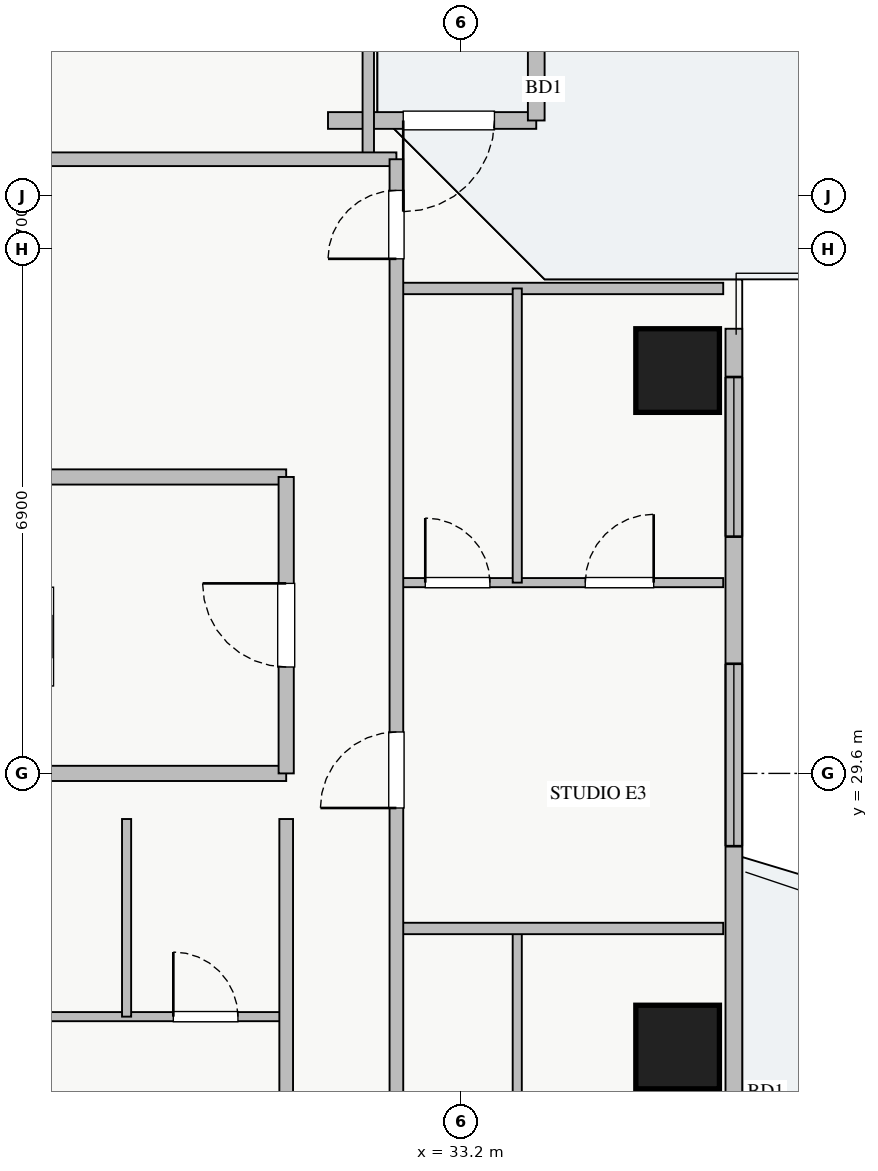
"""IFC4 building model, lengths in metres.
Left out: names, types, materials, properties, quantities, classifications, styles, units other than length and angle.
Written with IfcOpenShell. Run it as: python <this file> out.ifc"""

import sys

from ifc_helpers import new_model, si_unit, direction, frame, frame_2d, origin, origin_2d, place, context, subcontext, project, spatial, rectangle, extrude, source, transform, mapped, element, fill, save


model = new_model("IFC4")
c1 = context("Model", 3, precision=1e-05, world=origin(), true_north=direction((0.0, 1.0)))
c2 = subcontext(c1, "Body", "Model", "MODEL_VIEW")
j1 = project(units=[si_unit("LENGTHUNIT", "METRE"), si_unit("PLANEANGLEUNIT", "RADIAN")], contexts=[c1])
p1 = place(None, origin())
s1 = spatial("IfcSite", under=j1, at=p1, CompositionType="ELEMENT")
p2 = place(p1, origin())
s2 = spatial("IfcBuilding", under=s1, at=p2, CompositionType="ELEMENT")
p3 = place(p2, frame((0.0, 0.0, 123.0)))
s3 = spatial("IfcBuildingStorey", under=s2, at=p3, CompositionType="ELEMENT", Elevation=123.0)
m1 = source(origin(), c2, "Body", "SweptSolid", [
    extrude(rectangle(XDim=1.1, YDim=1.1, at=origin_2d()), origin(), (0.0, 0.0, 1.0), 3.25),
])
for number, where, z_axis, x_axis in (
    (1, (36.05, 26.0, 0.0), (0.0, 0.0, 1.0), (1.0, 0.0, 0.0)),
    (2, (36.05, 34.9, 0.0), (0.0, 0.0, 1.0), (1.0, 0.0, 0.0)),
):
    element("IfcColumn", number, at=place(p3, frame(where, z_axis=z_axis, x_axis=x_axis)), inside=s3, PredefinedType="COLUMN", context=c2, shape_type="MappedRepresentation", body=[
        mapped(m1, transform((0.0, 0.0, 0.0), x_axis=(1.0, 0.0, 0.0), y_axis=(0.0, 1.0, 0.0), z_axis=(0.0, 0.0, 1.0), scale=1.0)),
    ])
p4 = place(p3, frame((36.79, 10.55, 0.0), z_axis=(0.0, 0.0, 1.0), x_axis=(0.0, 1.0, 0.0)))
e3 = element("IfcWall", 3, at=p4, inside=s3, PredefinedType="STANDARD", context=c2, shape_type="SweptSolid", body=[
    extrude(rectangle(XDim=24.9, YDim=0.22, at=frame_2d((12.45, 0.0))), origin(), (0.0, 0.0, 1.0), 2.61),
])
p5 = place(p4, frame((13.3, 0.0, 0.0)))
e4 = element("IfcOpeningElement", 4, at=p5, cuts=e3, PredefinedType="OPENING", context=c2, shape_type="SweptSolid", body=[
    extrude(rectangle(XDim=1.2, YDim=2.1, at=frame_2d((0.6, 1.05))), frame((0.0, 0.12, 0.0), z_axis=(0.0, -1.0, 0.0), x_axis=(1.0, 0.0, 0.0)), (0.0, 0.0, 1.0), 0.24),
])
p6 = place(p4, frame((1.912, 0.0, 0.9)))
e5 = element("IfcOpeningElement", 5, at=p6, cuts=e3, PredefinedType="OPENING", context=c2, shape_type="SweptSolid", body=[
    extrude(rectangle(XDim=2.4, YDim=1.48, at=frame_2d((1.2, 0.74))), frame((0.0, 0.12, 0.0), z_axis=(0.0, -1.0, 0.0), x_axis=(1.0, 0.0, 0.0)), (0.0, 0.0, 1.0), 0.24),
])
p7 = place(p4, frame((22.165, 0.0, 0.9)))
e6 = element("IfcOpeningElement", 6, at=p7, cuts=e3, PredefinedType="OPENING", context=c2, shape_type="SweptSolid", body=[
    extrude(rectangle(XDim=2.1, YDim=1.5, at=frame_2d((1.05, 0.75))), frame((0.0, 0.12, 0.0), z_axis=(0.0, -1.0, 0.0), x_axis=(1.0, 0.0, 0.0)), (0.0, 0.0, 1.0), 0.24),
])
p8 = place(p4, frame((18.093, 0.0, 0.9)))
e7 = element("IfcOpeningElement", 7, at=p8, cuts=e3, PredefinedType="OPENING", context=c2, shape_type="SweptSolid", body=[
    extrude(rectangle(XDim=2.4, YDim=1.5, at=frame_2d((1.2, 0.75))), frame((0.0, 0.12, 0.0), z_axis=(0.0, -1.0, 0.0), x_axis=(1.0, 0.0, 0.0)), (0.0, 0.0, 1.0), 0.24),
])
p9 = place(p4, frame((7.875, 0.0, 0.9)))
e8 = element("IfcOpeningElement", 8, at=p9, cuts=e3, PredefinedType="OPENING", context=c2, shape_type="SweptSolid", body=[
    extrude(rectangle(XDim=0.9, YDim=1.2, at=frame_2d((0.45, 0.6))), frame((0.0, 0.12, 0.0), z_axis=(0.0, -1.0, 0.0), x_axis=(1.0, 0.0, 0.0)), (0.0, 0.0, 1.0), 0.24),
])
p10 = place(p3, frame((31.45, 38.19, 0.0), z_axis=(0.0, 0.0, 1.0), x_axis=(1.0, 0.0, 0.0)))
e9 = element("IfcWall", 9, at=p10, inside=s3, PredefinedType="STANDARD", context=c2, shape_type="SweptSolid", body=[
    extrude(rectangle(XDim=2.74, YDim=0.22, at=frame_2d((1.37, 0.0))), origin(), (0.0, 0.0, 1.0), 2.61),
])
p11 = place(p10, frame((0.99, 0.0, 0.0)))
e10 = element("IfcOpeningElement", 10, at=p11, cuts=e9, PredefinedType="OPENING", context=c2, shape_type="SweptSolid", body=[
    extrude(rectangle(XDim=1.2, YDim=2.1, at=frame_2d((0.6, 1.05))), frame((0.0, 0.12, 0.0), z_axis=(0.0, -1.0, 0.0), x_axis=(1.0, 0.0, 0.0)), (0.0, 0.0, 1.0), 0.24),
])
p12 = place(p3, frame((34.19, 38.19, 0.0), z_axis=(0.0, 0.0, 1.0), x_axis=(0.0, 1.0, 0.0)))
e11 = element("IfcWall", 11, at=p12, inside=s3, PredefinedType="STANDARD", context=c2, shape_type="SweptSolid", body=[
    extrude(rectangle(XDim=2.86, YDim=0.22, at=frame_2d((1.43, 0.0))), origin(), (0.0, 0.0, 1.0), 2.61),
])
for number, where, z_axis, x_axis in (
    (12, (27.8, 29.6, 0.0), (0.0, 0.0, 1.0), (1.0, 0.0, 0.0)),
    (13, (27.8, 33.5, 0.0), (0.0, 0.0, 1.0), (1.0, 0.0, 0.0)),
):
    element("IfcWall", number, at=place(p3, frame(where, z_axis=z_axis, x_axis=x_axis)), inside=s3, PredefinedType="PARTITIONING", context=c2, shape_type="SweptSolid", body=[
        extrude(rectangle(XDim=3.1, YDim=0.2, at=frame_2d((1.55, 0.0))), origin(), (0.0, 0.0, 1.0), 3.07),
    ])
p13 = place(p3, frame((30.9, 29.6, 0.0), z_axis=(0.0, 0.0, 1.0), x_axis=(0.0, 1.0, 0.0)))
e14 = element("IfcWall", 14, at=p13, inside=s3, PredefinedType="PARTITIONING", context=c2, shape_type="SweptSolid", body=[
    extrude(rectangle(XDim=3.9, YDim=0.2, at=frame_2d((1.95, 0.0))), origin(), (0.0, 0.0, 1.0), 3.07),
])
p14 = place(p13, frame((1.4, 0.0, 0.0)))
e15 = element("IfcOpeningElement", 15, at=p14, cuts=e14, PredefinedType="OPENING", context=c2, shape_type="SweptSolid", body=[
    extrude(rectangle(XDim=1.1, YDim=2.05, at=frame_2d((0.55, 1.025))), frame((0.0, 0.11, 0.0), z_axis=(0.0, -1.0, 0.0), x_axis=(1.0, 0.0, 0.0)), (0.0, 0.0, 1.0), 0.22),
])
p15 = place(p3, frame((31.98, 37.68, 0.0), z_axis=(0.0, 0.0, 1.0), x_axis=(0.0, 1.0, 0.0)))
e16 = element("IfcWall", 16, at=p15, inside=s3, PredefinedType="PARTITIONING", context=c2, shape_type="SweptSolid", body=[
    extrude(rectangle(XDim=2.97, YDim=0.15, at=frame_2d((1.485, 0.0))), origin(), (0.0, 0.0, 1.0), 3.07),
])
p16 = place(p3, frame((8.72, 37.68, 0.0), z_axis=(0.0, 0.0, 1.0), x_axis=(1.0, 0.0, 0.0)))
e17 = element("IfcWall", 17, at=p16, inside=s3, PredefinedType="PARTITIONING", context=c2, shape_type="SweptSolid", body=[
    extrude(rectangle(XDim=23.63, YDim=0.18, at=frame_2d((11.815, 0.0))), origin(), (0.0, 0.0, 1.0), 3.07),
])
p17 = place(p16, frame((6.04, 0.0, 0.0)))
e18 = element("IfcOpeningElement", 18, at=p17, cuts=e17, PredefinedType="OPENING", context=c2, shape_type="SweptSolid", body=[
    extrude(rectangle(XDim=1.0, YDim=2.05, at=frame_2d((0.5, 1.025))), frame((0.0, 0.1, 0.0), z_axis=(0.0, -1.0, 0.0), x_axis=(1.0, 0.0, 0.0)), (0.0, 0.0, 1.0), 0.2),
])
p18 = place(p16, frame((17.67, 0.0, 0.0)))
e19 = element("IfcOpeningElement", 19, at=p18, cuts=e17, PredefinedType="OPENING", context=c2, shape_type="SweptSolid", body=[
    extrude(rectangle(XDim=1.0, YDim=2.05, at=frame_2d((0.5, 1.025))), frame((0.0, 0.1, 0.0), z_axis=(0.0, -1.0, 0.0), x_axis=(1.0, 0.0, 0.0)), (0.0, 0.0, 1.0), 0.2),
])
p19 = place(p3, frame((32.35, 35.98, 0.0), z_axis=(0.0, 0.0, 1.0), x_axis=(1.0, 0.0, 0.0)))
e20 = element("IfcWall", 20, at=p19, inside=s3, PredefinedType="PARTITIONING", context=c2, shape_type="SweptSolid", body=[
    extrude(rectangle(XDim=4.3, YDim=0.15, at=frame_2d((2.15, 0.0))), origin(), (0.0, 0.0, 1.0), 3.07),
])
p20 = place(p3, frame((33.94, 23.1, 0.0), z_axis=(0.0, 0.0, 1.0), x_axis=(0.0, 1.0, 0.0)))
e21 = element("IfcWall", 21, at=p20, inside=s3, PredefinedType="PLUMBINGWALL", context=c2, shape_type="SweptSolid", body=[
    extrude(rectangle(XDim=4.46, YDim=0.12, at=frame_2d((2.23, 0.0))), origin(), (0.0, 0.0, 1.0), 3.07),
])
p21 = place(p3, frame((32.35, 32.11, 0.0), z_axis=(0.0, 0.0, 1.0), x_axis=(1.0, 0.0, 0.0)))
e22 = element("IfcWall", 22, at=p21, inside=s3, PredefinedType="PLUMBINGWALL", context=c2, shape_type="SweptSolid", body=[
    extrude(rectangle(XDim=4.3, YDim=0.12, at=frame_2d((2.15, 0.0))), origin(), (0.0, 0.0, 1.0), 3.07),
])
p22 = place(p21, frame((0.38, 0.0, 0.0)))
e23 = element("IfcOpeningElement", 23, at=p22, cuts=e22, PredefinedType="OPENING", context=c2, shape_type="SweptSolid", body=[
    extrude(rectangle(XDim=0.85, YDim=2.05, at=frame_2d((0.425, 1.025))), frame((0.0, 0.07, 0.0), z_axis=(0.0, -1.0, 0.0), x_axis=(1.0, 0.0, 0.0)), (0.0, 0.0, 1.0), 0.14),
])
p23 = place(p21, frame((2.485, 0.0, 0.0)))
e24 = element("IfcOpeningElement", 24, at=p23, cuts=e22, PredefinedType="OPENING", context=c2, shape_type="SweptSolid", body=[
    extrude(rectangle(XDim=0.9, YDim=2.05, at=frame_2d((0.45, 1.025))), frame((0.0, 0.07, 0.0), z_axis=(0.0, -1.0, 0.0), x_axis=(1.0, 0.0, 0.0)), (0.0, 0.0, 1.0), 0.14),
])
p24 = place(p3, frame((33.94, 32.11, 0.0), z_axis=(0.0, 0.0, 1.0), x_axis=(0.0, 1.0, 0.0)))
e25 = element("IfcWall", 25, at=p24, inside=s3, PredefinedType="PLUMBINGWALL", context=c2, shape_type="SweptSolid", body=[
    extrude(rectangle(XDim=3.87, YDim=0.12, at=frame_2d((1.935, 0.0))), origin(), (0.0, 0.0, 1.0), 3.07),
])
p25 = place(p3, frame((32.35, 27.56, 0.0), z_axis=(0.0, 0.0, 1.0), x_axis=(1.0, 0.0, 0.0)))
e26 = element("IfcWall", 26, at=p25, inside=s3, PredefinedType="PARTITIONING", context=c2, shape_type="SweptSolid", body=[
    extrude(rectangle(XDim=4.3, YDim=0.15, at=frame_2d((2.15, 0.0))), origin(), (0.0, 0.0, 1.0), 3.07),
])
p26 = place(p3, frame((32.35, 8.31, 0.0), z_axis=(0.0, 0.0, 1.0), x_axis=(0.0, 1.0, 0.0)))
e27 = element("IfcWall", 27, at=p26, inside=s3, PredefinedType="PARTITIONING", context=c2, shape_type="SweptSolid", body=[
    extrude(rectangle(XDim=29.37, YDim=0.18, at=frame_2d((14.685, 0.0))), origin(), (0.0, 0.0, 1.0), 3.07),
])
p27 = place(p26, frame((28.06, 0.0, 0.0)))
e28 = element("IfcOpeningElement", 28, at=p27, cuts=e27, PredefinedType="OPENING", context=c2, shape_type="SweptSolid", body=[
    extrude(rectangle(XDim=0.9, YDim=2.05, at=frame_2d((0.45, 1.025))), frame((0.0, 0.1, 0.0), z_axis=(0.0, -1.0, 0.0), x_axis=(1.0, 0.0, 0.0)), (0.0, 0.0, 1.0), 0.2),
])
p28 = place(p26, frame((0.415, 0.0, 0.0)))
e29 = element("IfcOpeningElement", 29, at=p28, cuts=e27, PredefinedType="OPENING", context=c2, shape_type="SweptSolid", body=[
    extrude(rectangle(XDim=0.9, YDim=2.05, at=frame_2d((0.45, 1.025))), frame((0.0, 0.1, 0.0), z_axis=(0.0, -1.0, 0.0), x_axis=(1.0, 0.0, 0.0)), (0.0, 0.0, 1.0), 0.2),
])
p29 = place(p26, frame((5.295, 0.0, 0.0)))
e30 = element("IfcOpeningElement", 30, at=p29, cuts=e27, PredefinedType="OPENING", context=c2, shape_type="SweptSolid", body=[
    extrude(rectangle(XDim=1.0, YDim=2.05, at=frame_2d((0.5, 1.025))), frame((0.0, 0.1, 0.0), z_axis=(0.0, -1.0, 0.0), x_axis=(1.0, 0.0, 0.0)), (0.0, 0.0, 1.0), 0.2),
])
p30 = place(p26, frame((11.645, 0.0, 0.0)))
e31 = element("IfcOpeningElement", 31, at=p30, cuts=e27, PredefinedType="OPENING", context=c2, shape_type="SweptSolid", body=[
    extrude(rectangle(XDim=1.0, YDim=2.05, at=frame_2d((0.5, 1.025))), frame((0.0, 0.1, 0.0), z_axis=(0.0, -1.0, 0.0), x_axis=(1.0, 0.0, 0.0)), (0.0, 0.0, 1.0), 0.2),
])
p31 = place(p26, frame((20.835, 0.0, 0.0)))
e32 = element("IfcOpeningElement", 32, at=p31, cuts=e27, PredefinedType="OPENING", context=c2, shape_type="SweptSolid", body=[
    extrude(rectangle(XDim=1.0, YDim=2.05, at=frame_2d((0.5, 1.025))), frame((0.0, 0.1, 0.0), z_axis=(0.0, -1.0, 0.0), x_axis=(1.0, 0.0, 0.0)), (0.0, 0.0, 1.0), 0.2),
])
p32 = place(p3, frame((25.22, 26.4, 0.0), z_axis=(0.0, 0.0, 1.0), x_axis=(1.0, 0.0, 0.0)))
e33 = element("IfcWall", 33, at=p32, inside=s3, PredefinedType="PLUMBINGWALL", context=c2, shape_type="SweptSolid", body=[
    extrude(rectangle(XDim=5.68, YDim=0.12, at=frame_2d((2.84, 0.0))), origin(), (0.0, 0.0, 1.0), 3.07),
])
p33 = place(p32, frame((1.35, 0.0, 0.0)))
e34 = element("IfcOpeningElement", 34, at=p33, cuts=e33, PredefinedType="OPENING", context=c2, shape_type="SweptSolid", body=[
    extrude(rectangle(XDim=0.9, YDim=2.05, at=frame_2d((0.45, 1.025))), frame((0.0, 0.07, 0.0), z_axis=(0.0, -1.0, 0.0), x_axis=(1.0, 0.0, 0.0)), (0.0, 0.0, 1.0), 0.14),
])
p34 = place(p32, frame((4.195, 0.0, 0.0)))
e35 = element("IfcOpeningElement", 35, at=p34, cuts=e33, PredefinedType="OPENING", context=c2, shape_type="SweptSolid", body=[
    extrude(rectangle(XDim=0.85, YDim=2.05, at=frame_2d((0.425, 1.025))), frame((0.0, 0.07, 0.0), z_axis=(0.0, -1.0, 0.0), x_axis=(1.0, 0.0, 0.0)), (0.0, 0.0, 1.0), 0.14),
])
p35 = place(p3, frame((28.8, 26.4, 0.0), z_axis=(0.0, 0.0, 1.0), x_axis=(0.0, 1.0, 0.0)))
e36 = element("IfcWall", 36, at=p35, inside=s3, PredefinedType="PLUMBINGWALL", context=c2, shape_type="SweptSolid", body=[
    extrude(rectangle(XDim=2.6, YDim=0.12, at=frame_2d((1.3, 0.0))), origin(), (0.0, 0.0, 1.0), 3.07),
])
p36 = place(p3, frame((30.9, 17.0, 0.0), z_axis=(0.0, 0.0, 1.0), x_axis=(0.0, 1.0, 0.0)))
e37 = element("IfcWall", 37, at=p36, inside=s3, PredefinedType="PARTITIONING", context=c2, shape_type="SweptSolid", body=[
    extrude(rectangle(XDim=12.0, YDim=0.18, at=frame_2d((6.0, 0.0))), origin(), (0.0, 0.0, 1.0), 3.07),
])
p37 = place(p36, frame((1.025, 0.0, 0.0)))
e38 = element("IfcOpeningElement", 38, at=p37, cuts=e37, PredefinedType="OPENING", context=c2, shape_type="SweptSolid", body=[
    extrude(rectangle(XDim=1.0, YDim=2.05, at=frame_2d((0.5, 1.025))), frame((0.0, 0.1, 0.0), z_axis=(0.0, -1.0, 0.0), x_axis=(1.0, 0.0, 0.0)), (0.0, 0.0, 1.0), 0.2),
])
p38 = place(p36, frame((7.185, 0.0, 0.0)))
e39 = element("IfcOpeningElement", 39, at=p38, cuts=e37, PredefinedType="OPENING", context=c2, shape_type="SweptSolid", body=[
    extrude(rectangle(XDim=1.0, YDim=2.05, at=frame_2d((0.5, 1.025))), frame((0.0, 0.1, 0.0), z_axis=(0.0, -1.0, 0.0), x_axis=(1.0, 0.0, 0.0)), (0.0, 0.0, 1.0), 0.2),
])
m2 = source(origin(), c2, "Body", "SweptSolid", [
    extrude(rectangle(XDim=2.1, YDim=1.5, at=frame_2d((1.05, 0.75))), frame((0.0, 0.03, 0.0), z_axis=(0.0, -1.0, 0.0), x_axis=(1.0, 0.0, 0.0)), (0.0, 0.0, 1.0), 0.06),
])
p39 = place(p7, origin())
e40 = element("IfcWindow", 40, at=p39, inside=s3, PartitioningType="TRIPLE_PANEL_VERTICAL", PredefinedType="WINDOW", context=c2, shape_type="MappedRepresentation", body=[
    mapped(m2, transform((0.0, 0.0, 0.0), x_axis=(1.0, 0.0, 0.0), y_axis=(0.0, 1.0, 0.0), z_axis=(0.0, 0.0, 1.0), scale=1.0)),
])
fill(e6, e40)
m3 = source(origin(), c2, "Body", "SweptSolid", [
    extrude(rectangle(XDim=1.2, YDim=2.1, at=frame_2d((0.6, 1.05))), frame((0.0, 0.025, 0.0), z_axis=(0.0, -1.0, 0.0), x_axis=(1.0, 0.0, 0.0)), (0.0, 0.0, 1.0), 0.05),
])
p40 = place(p11, frame((1.2, 0.0, 0.0), z_axis=(0.0, 0.0, 1.0), x_axis=(-1.0, 0.0, 0.0)))
e41 = element("IfcDoor", 41, at=p40, inside=s3, OperationType="SINGLE_SWING_LEFT", PredefinedType="DOOR", context=c2, shape_type="MappedRepresentation", body=[
    mapped(m3, transform((0.0, 0.0, 0.0), x_axis=(1.0, 0.0, 0.0), y_axis=(0.0, 1.0, 0.0), z_axis=(0.0, 0.0, 1.0), scale=1.0)),
])
fill(e10, e41)
m4 = source(origin(), c2, "Body", "SweptSolid", [
    extrude(rectangle(XDim=1.1, YDim=2.05, at=frame_2d((0.55, 1.025))), frame((0.0, 0.025, 0.0), z_axis=(0.0, -1.0, 0.0), x_axis=(1.0, 0.0, 0.0)), (0.0, 0.0, 1.0), 0.05),
])
p41 = place(p14, origin())
e42 = element("IfcDoor", 42, at=p41, inside=s3, OperationType="SINGLE_SWING_RIGHT", PredefinedType="DOOR", context=c2, shape_type="MappedRepresentation", body=[
    mapped(m4, transform((0.0, 0.0, 0.0), x_axis=(1.0, 0.0, 0.0), y_axis=(0.0, 1.0, 0.0), z_axis=(0.0, 0.0, 1.0), scale=1.0)),
])
fill(e15, e42)
m5 = source(origin(), c2, "Body", "SweptSolid", [
    extrude(rectangle(XDim=0.85, YDim=2.05, at=frame_2d((0.425, 1.025))), frame((0.0, 0.025, 0.0), z_axis=(0.0, -1.0, 0.0), x_axis=(1.0, 0.0, 0.0)), (0.0, 0.0, 1.0), 0.05),
])
p42 = place(p22, origin())
e43 = element("IfcDoor", 43, at=p42, inside=s3, OperationType="SINGLE_SWING_LEFT", PredefinedType="DOOR", context=c2, shape_type="MappedRepresentation", body=[
    mapped(m5, transform((0.0, 0.0, 0.0), x_axis=(1.0, 0.0, 0.0), y_axis=(0.0, 1.0, 0.0), z_axis=(0.0, 0.0, 1.0), scale=1.0)),
])
fill(e23, e43)
m6 = source(origin(), c2, "Body", "SweptSolid", [
    extrude(rectangle(XDim=0.9, YDim=2.05, at=frame_2d((0.45, 1.025))), frame((0.0, 0.025, 0.0), z_axis=(0.0, -1.0, 0.0), x_axis=(1.0, 0.0, 0.0)), (0.0, 0.0, 1.0), 0.05),
])
p43 = place(p23, origin())
e44 = element("IfcDoor", 44, at=p43, inside=s3, OperationType="SINGLE_SWING_RIGHT", PredefinedType="DOOR", context=c2, shape_type="MappedRepresentation", body=[
    mapped(m6, transform((0.0, 0.0, 0.0), x_axis=(1.0, 0.0, 0.0), y_axis=(0.0, 1.0, 0.0), z_axis=(0.0, 0.0, 1.0), scale=1.0)),
])
fill(e24, e44)
p44 = place(p27, origin())
e45 = element("IfcDoor", 45, at=p44, inside=s3, OperationType="SINGLE_SWING_LEFT", PredefinedType="DOOR", context=c2, shape_type="MappedRepresentation", body=[
    mapped(m6, transform((0.0, 0.0, 0.0), x_axis=(1.0, 0.0, 0.0), y_axis=(0.0, 1.0, 0.0), z_axis=(0.0, 0.0, 1.0), scale=1.0)),
])
fill(e28, e45)
m7 = source(origin(), c2, "Body", "SweptSolid", [
    extrude(rectangle(XDim=1.0, YDim=2.05, at=frame_2d((0.5, 1.025))), frame((0.0, 0.025, 0.0), z_axis=(0.0, -1.0, 0.0), x_axis=(1.0, 0.0, 0.0)), (0.0, 0.0, 1.0), 0.05),
])
p45 = place(p31, origin())
e46 = element("IfcDoor", 46, at=p45, inside=s3, OperationType="SINGLE_SWING_LEFT", PredefinedType="DOOR", context=c2, shape_type="MappedRepresentation", body=[
    mapped(m7, transform((0.0, 0.0, 0.0), x_axis=(1.0, 0.0, 0.0), y_axis=(0.0, 1.0, 0.0), z_axis=(0.0, 0.0, 1.0), scale=1.0)),
])
fill(e32, e46)
p46 = place(p34, origin())
e47 = element("IfcDoor", 47, at=p46, inside=s3, OperationType="SINGLE_SWING_LEFT", PredefinedType="DOOR", context=c2, shape_type="MappedRepresentation", body=[
    mapped(m5, transform((0.0, 0.0, 0.0), x_axis=(1.0, 0.0, 0.0), y_axis=(0.0, 1.0, 0.0), z_axis=(0.0, 0.0, 1.0), scale=1.0)),
])
fill(e35, e47)
m8 = source(origin(), c2, "Body", "SweptSolid", [
    extrude(rectangle(XDim=2.4, YDim=1.5, at=frame_2d((1.2, 0.75))), frame((0.0, 0.03, 0.0), z_axis=(0.0, -1.0, 0.0), x_axis=(1.0, 0.0, 0.0)), (0.0, 0.0, 1.0), 0.06),
])
p47 = place(p8, origin())
e48 = element("IfcWindow", 48, at=p47, inside=s3, PartitioningType="TRIPLE_PANEL_VERTICAL", PredefinedType="WINDOW", context=c2, shape_type="MappedRepresentation", body=[
    mapped(m8, transform((0.0, 0.0, 0.0), x_axis=(1.0, 0.0, 0.0), y_axis=(0.0, 1.0, 0.0), z_axis=(0.0, 0.0, 1.0), scale=1.0)),
])
fill(e7, e48)
save(model, sys.argv[1])
